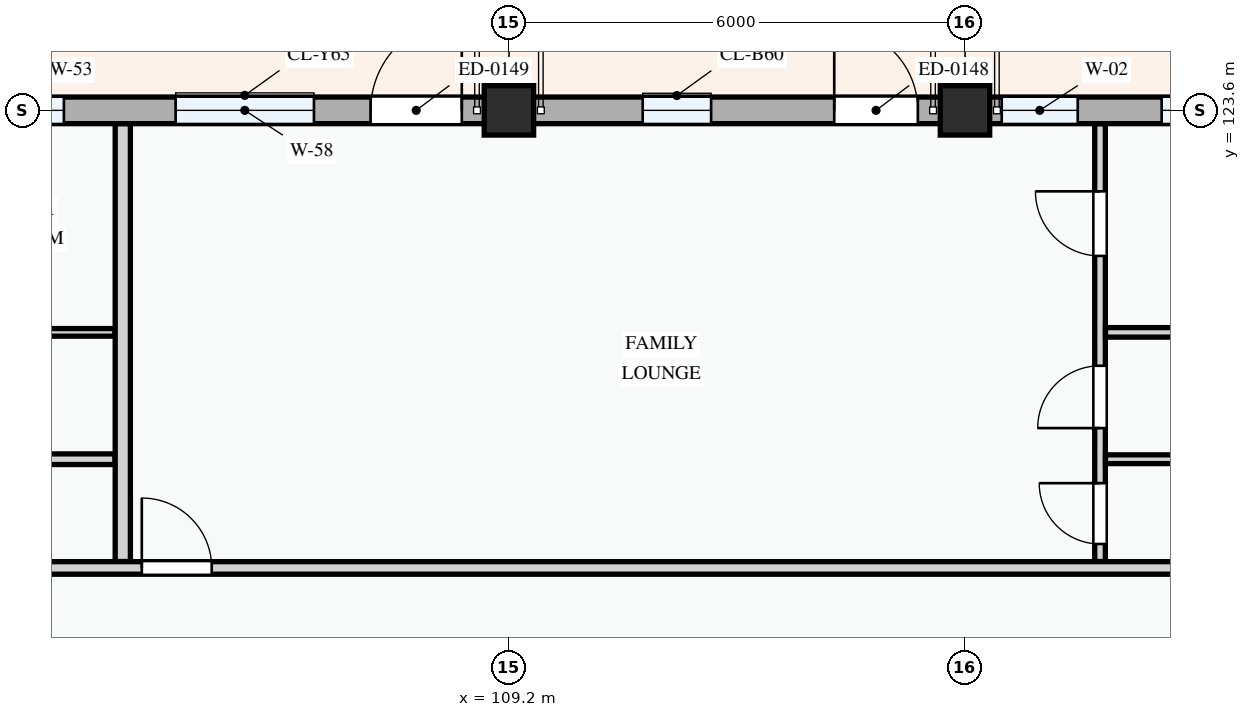
"""IFC4 building model, lengths in metres.
Left out: names, types, materials, properties, quantities, classifications, styles, units other than length and angle.
Written with IfcOpenShell. Run it as: python <this file> out.ifc"""

import sys

from ifc_helpers import new_model, si_unit, direction, frame, frame_2d, origin, origin_2d, place, context, subcontext, project, spatial, rectangle, extrude, element, fill, save


model = new_model("IFC4")
c1 = context("Model", 3, precision=1e-05, world=origin(), true_north=direction((0.0, 1.0)))
c2 = subcontext(c1, "Body", "Model", "MODEL_VIEW")
j1 = project(units=[si_unit("LENGTHUNIT", "METRE"), si_unit("PLANEANGLEUNIT", "RADIAN")], contexts=[c1])
p1 = place(None, origin())
s1 = spatial("IfcSite", under=j1, at=p1, CompositionType="ELEMENT")
p2 = place(p1, origin())
s2 = spatial("IfcBuilding", under=s1, at=p2, CompositionType="ELEMENT")
p3 = place(p2, frame((0.0, 0.0, 11.4)))
s3 = spatial("IfcBuildingStorey", under=s2, at=p3, CompositionType="ELEMENT", Elevation=11.4)
for number, where, z_axis, x_axis in (
    (1, (109.2, 123.6, 0.0), (0.0, 0.0, 1.0), (1.0, 0.0, 0.0)),
    (2, (115.2, 123.6, 0.0), (0.0, 0.0, 1.0), (1.0, 0.0, 0.0)),
):
    element("IfcColumn", number, at=place(p3, frame(where, z_axis=z_axis, x_axis=x_axis)), inside=s3, PredefinedType="COLUMN", context=c2, shape_type="SweptSolid", body=[
        extrude(rectangle(XDim=0.65, YDim=0.65, at=origin_2d()), origin(), (0.0, 0.0, 1.0), 3.3),
    ])
p4 = place(p3, frame((123.6, 123.6, 0.0), z_axis=(0.0, 0.0, 1.0), x_axis=(-1.0, 0.0, 0.0)))
e3 = element("IfcWall", 3, at=p4, inside=s3, PredefinedType="STANDARD", context=c2, shape_type="SweptSolid", body=[
    extrude(rectangle(XDim=8.4, YDim=0.35, at=frame_2d((4.2, 0.0))), origin(), (0.0, 0.0, 1.0), 2.375),
])
p5 = place(p4, frame((0.62, 0.0, 0.0)))
e4 = element("IfcOpeningElement", 4, at=p5, cuts=e3, PredefinedType="OPENING", context=c2, shape_type="SweptSolid", body=[
    extrude(rectangle(XDim=1.05, YDim=2.15, at=frame_2d((0.525, 1.075))), frame((0.0, 0.185, 0.0), z_axis=(0.0, -1.0, 0.0), x_axis=(1.0, 0.0, 0.0)), (0.0, 0.0, 1.0), 0.37),
])
p6 = place(p4, frame((2.221, 0.0, 0.78)))
e5 = element("IfcOpeningElement", 5, at=p6, cuts=e3, PredefinedType="OPENING", context=c2, shape_type="SweptSolid", body=[
    extrude(rectangle(XDim=1.52, YDim=1.42, at=frame_2d((0.76, 0.71))), frame((0.0, 0.185, 0.0), z_axis=(0.0, -1.0, 0.0), x_axis=(1.0, 0.0, 0.0)), (0.0, 0.0, 1.0), 0.37),
])
p7 = place(p4, frame((4.912, 0.0, 0.78)))
e6 = element("IfcOpeningElement", 6, at=p7, cuts=e3, PredefinedType="OPENING", context=c2, shape_type="SweptSolid", body=[
    extrude(rectangle(XDim=0.9, YDim=1.2, at=frame_2d((0.45, 0.6))), frame((0.0, 0.185, 0.0), z_axis=(0.0, -1.0, 0.0), x_axis=(1.0, 0.0, 0.0)), (0.0, 0.0, 1.0), 0.37),
])
p8 = place(p4, frame((6.917, 0.0, 0.78)))
e7 = element("IfcOpeningElement", 7, at=p8, cuts=e3, PredefinedType="OPENING", context=c2, shape_type="SweptSolid", body=[
    extrude(rectangle(XDim=1.0, YDim=1.25, at=frame_2d((0.5, 0.625))), frame((0.0, 0.185, 0.0), z_axis=(0.0, -1.0, 0.0), x_axis=(1.0, 0.0, 0.0)), (0.0, 0.0, 1.0), 0.37),
])
p9 = place(p3, frame((115.2, 123.6, 0.0), z_axis=(0.0, 0.0, 1.0), x_axis=(-1.0, 0.0, 0.0)))
e8 = element("IfcWall", 8, at=p9, inside=s3, PredefinedType="STANDARD", context=c2, shape_type="SweptSolid", body=[
    extrude(rectangle(XDim=6.0, YDim=0.35, at=frame_2d((3.0, 0.0))), origin(), (0.0, 0.0, 1.0), 2.475),
])
p10 = place(p9, frame((0.62, 0.0, 0.0)))
e9 = element("IfcOpeningElement", 9, at=p10, cuts=e8, PredefinedType="OPENING", context=c2, shape_type="SweptSolid", body=[
    extrude(rectangle(XDim=1.1, YDim=2.15, at=frame_2d((0.55, 1.075))), frame((0.0, 0.185, 0.0), z_axis=(0.0, -1.0, 0.0), x_axis=(1.0, 0.0, 0.0)), (0.0, 0.0, 1.0), 0.37),
])
p11 = place(p9, frame((3.34, 0.0, 0.78)))
e10 = element("IfcOpeningElement", 10, at=p11, cuts=e8, PredefinedType="OPENING", context=c2, shape_type="SweptSolid", body=[
    extrude(rectangle(XDim=0.9, YDim=1.2, at=frame_2d((0.45, 0.6))), frame((0.0, 0.185, 0.0), z_axis=(0.0, -1.0, 0.0), x_axis=(1.0, 0.0, 0.0)), (0.0, 0.0, 1.0), 0.37),
])
p12 = place(p3, frame((109.2, 123.6, 0.0), z_axis=(0.0, 0.0, 1.0), x_axis=(-1.0, 0.0, 0.0)))
e11 = element("IfcWall", 11, at=p12, inside=s3, PredefinedType="STANDARD", context=c2, shape_type="SweptSolid", body=[
    extrude(rectangle(XDim=8.4, YDim=0.35, at=frame_2d((4.2, 0.0))), origin(), (0.0, 0.0, 1.0), 2.375),
])
p13 = place(p12, frame((0.62, 0.0, 0.0)))
e12 = element("IfcOpeningElement", 12, at=p13, cuts=e11, PredefinedType="OPENING", context=c2, shape_type="SweptSolid", body=[
    extrude(rectangle(XDim=1.2, YDim=2.15, at=frame_2d((0.6, 1.075))), frame((0.0, 0.185, 0.0), z_axis=(0.0, -1.0, 0.0), x_axis=(1.0, 0.0, 0.0)), (0.0, 0.0, 1.0), 0.37),
])
p14 = place(p12, frame((2.565, 0.0, 0.78)))
e13 = element("IfcOpeningElement", 13, at=p14, cuts=e11, PredefinedType="OPENING", context=c2, shape_type="SweptSolid", body=[
    extrude(rectangle(XDim=1.82, YDim=1.46, at=frame_2d((0.91, 0.73))), frame((0.0, 0.185, 0.0), z_axis=(0.0, -1.0, 0.0), x_axis=(1.0, 0.0, 0.0)), (0.0, 0.0, 1.0), 0.37),
])
p15 = place(p12, frame((5.855, 0.0, 0.78)))
e14 = element("IfcOpeningElement", 14, at=p15, cuts=e11, PredefinedType="OPENING", context=c2, shape_type="SweptSolid", body=[
    extrude(rectangle(XDim=1.58, YDim=1.48, at=frame_2d((0.79, 0.74))), frame((0.0, 0.185, 0.0), z_axis=(0.0, -1.0, 0.0), x_axis=(1.0, 0.0, 0.0)), (0.0, 0.0, 1.0), 0.37),
])
p16 = place(p3, frame((91.876, 120.679, 0.0), z_axis=(0.0, 0.0, 1.0), x_axis=(1.0, 0.0, 0.0)))
e15 = element("IfcWall", 15, at=p16, inside=s3, PredefinedType="PARTITIONING", context=c2, shape_type="SweptSolid", body=[
    extrude(rectangle(XDim=12.142, YDim=0.1, at=frame_2d((6.071, 0.0))), origin(), (0.0, 0.0, 1.0), 3.0),
])
p17 = place(p3, frame((91.876, 119.01, 0.0), z_axis=(0.0, 0.0, 1.0), x_axis=(1.0, 0.0, 0.0)))
e16 = element("IfcWall", 16, at=p17, inside=s3, PredefinedType="PARTITIONING", context=c2, shape_type="SweptSolid", body=[
    extrude(rectangle(XDim=12.142, YDim=0.14, at=frame_2d((6.071, 0.0))), origin(), (0.0, 0.0, 1.0), 3.0),
])
p18 = place(p3, frame((116.977, 117.665, 0.0), z_axis=(0.0, 0.0, 1.0), x_axis=(0.0, 1.0, 0.0)))
e17 = element("IfcWall", 17, at=p18, inside=s3, PredefinedType="PARTITIONING", context=c2, shape_type="SweptSolid", body=[
    extrude(rectangle(XDim=5.759, YDim=0.14, at=frame_2d((2.879, 0.0))), origin(), (0.0, 0.0, 1.0), 3.0),
])
p19 = place(p18, frame((0.231, 0.0, 0.0)))
e18 = element("IfcOpeningElement", 18, at=p19, cuts=e17, PredefinedType="OPENING", context=c2, shape_type="SweptSolid", body=[
    extrude(rectangle(XDim=0.8, YDim=2.1, at=frame_2d((0.4, 1.05))), frame((0.0, 0.08, 0.0), z_axis=(0.0, -1.0, 0.0), x_axis=(1.0, 0.0, 0.0)), (0.0, 0.0, 1.0), 0.16),
])
p20 = place(p18, frame((1.755, 0.0, 0.0)))
e19 = element("IfcOpeningElement", 19, at=p20, cuts=e17, PredefinedType="OPENING", context=c2, shape_type="SweptSolid", body=[
    extrude(rectangle(XDim=0.82, YDim=2.08, at=frame_2d((0.41, 1.04))), frame((0.0, 0.08, 0.0), z_axis=(0.0, -1.0, 0.0), x_axis=(1.0, 0.0, 0.0)), (0.0, 0.0, 1.0), 0.16),
])
p21 = place(p18, frame((4.02, 0.0, 0.0)))
e20 = element("IfcOpeningElement", 20, at=p21, cuts=e17, PredefinedType="OPENING", context=c2, shape_type="SweptSolid", body=[
    extrude(rectangle(XDim=0.85, YDim=2.1, at=frame_2d((0.425, 1.05))), frame((0.0, 0.08, 0.0), z_axis=(0.0, -1.0, 0.0), x_axis=(1.0, 0.0, 0.0)), (0.0, 0.0, 1.0), 0.16),
])
p22 = place(p3, frame((117.049, 120.679, 0.0), z_axis=(0.0, 0.0, 1.0), x_axis=(1.0, 0.0, 0.0)))
e21 = element("IfcWall", 21, at=p22, inside=s3, PredefinedType="PARTITIONING", context=c2, shape_type="SweptSolid", body=[
    extrude(rectangle(XDim=10.637, YDim=0.125, at=frame_2d((5.318, 0.0))), origin(), (0.0, 0.0, 1.0), 3.0),
])
p23 = place(p3, frame((117.049, 119.01, 0.0), z_axis=(0.0, 0.0, 1.0), x_axis=(1.0, 0.0, 0.0)))
e22 = element("IfcWall", 22, at=p23, inside=s3, PredefinedType="PARTITIONING", context=c2, shape_type="SweptSolid", body=[
    extrude(rectangle(XDim=10.637, YDim=0.115, at=frame_2d((5.318, 0.0))), origin(), (0.0, 0.0, 1.0), 3.0),
])
p24 = place(p3, frame((104.12, 117.665, 0.0), z_axis=(0.0, 0.0, 1.0), x_axis=(0.0, 1.0, 0.0)))
e23 = element("IfcWall", 23, at=p24, inside=s3, PredefinedType="PARTITIONING", context=c2, shape_type="SweptSolid", body=[
    extrude(rectangle(XDim=5.759, YDim=0.2, at=frame_2d((2.879, 0.0))), origin(), (0.0, 0.0, 1.0), 3.0),
])
p25 = place(p3, frame((80.577, 117.58, 0.0), z_axis=(0.0, 0.0, 1.0), x_axis=(1.0, 0.0, 0.0)))
e24 = element("IfcWall", 24, at=p25, inside=s3, PredefinedType="PARTITIONING", context=c2, shape_type="SweptSolid", body=[
    extrude(rectangle(XDim=71.963, YDim=0.165, at=frame_2d((35.981, 0.0))), origin(), (0.0, 0.0, 1.0), 3.0),
])
p26 = place(p25, frame((9.411, 0.0, 0.0)))
e25 = element("IfcOpeningElement", 25, at=p26, cuts=e24, PredefinedType="OPENING", context=c2, shape_type="SweptSolid", body=[
    extrude(rectangle(XDim=0.96, YDim=2.12, at=frame_2d((0.48, 1.06))), frame((0.0, 0.093, 0.0), z_axis=(0.0, -1.0, 0.0), x_axis=(1.0, 0.0, 0.0)), (0.0, 0.0, 1.0), 0.185),
])
p27 = place(p25, frame((23.793, 0.0, 0.0)))
e26 = element("IfcOpeningElement", 26, at=p27, cuts=e24, PredefinedType="OPENING", context=c2, shape_type="SweptSolid", body=[
    extrude(rectangle(XDim=0.92, YDim=2.1, at=frame_2d((0.46, 1.05))), frame((0.0, 0.093, 0.0), z_axis=(0.0, -1.0, 0.0), x_axis=(1.0, 0.0, 0.0)), (0.0, 0.0, 1.0), 0.185),
])
p28 = place(p25, frame((52.718, 0.0, 0.0)))
e27 = element("IfcOpeningElement", 27, at=p28, cuts=e24, PredefinedType="OPENING", context=c2, shape_type="SweptSolid", body=[
    extrude(rectangle(XDim=0.92, YDim=2.1, at=frame_2d((0.46, 1.05))), frame((0.0, 0.093, 0.0), z_axis=(0.0, -1.0, 0.0), x_axis=(1.0, 0.0, 0.0)), (0.0, 0.0, 1.0), 0.185),
])
p29 = place(p7, origin())
e28 = element("IfcWindow", 28, at=p29, inside=s3, PartitioningType="SINGLE_PANEL", PredefinedType="WINDOW", context=c2, shape_type="SweptSolid", body=[
    extrude(rectangle(XDim=0.9, YDim=1.2, at=frame_2d((0.45, 0.6))), frame((0.0, 0.03, 0.0), z_axis=(0.0, -1.0, 0.0), x_axis=(1.0, 0.0, 0.0)), (0.0, 0.0, 1.0), 0.06),
])
fill(e6, e28)
p30 = place(p8, origin())
e29 = element("IfcWindow", 29, at=p30, inside=s3, PartitioningType="SINGLE_PANEL", PredefinedType="WINDOW", context=c2, shape_type="SweptSolid", body=[
    extrude(rectangle(XDim=1.0, YDim=1.25, at=frame_2d((0.5, 0.625))), frame((0.0, 0.03, 0.0), z_axis=(0.0, -1.0, 0.0), x_axis=(1.0, 0.0, 0.0)), (0.0, 0.0, 1.0), 0.06),
])
fill(e7, e29)
p31 = place(p10, frame((1.1, 0.0, 0.0), z_axis=(0.0, 0.0, 1.0), x_axis=(-1.0, 0.0, 0.0)))
e30 = element("IfcDoor", 30, at=p31, inside=s3, OperationType="SINGLE_SWING_LEFT", PredefinedType="DOOR", context=c2, shape_type="SweptSolid", body=[
    extrude(rectangle(XDim=1.1, YDim=2.15, at=frame_2d((0.55, 1.075))), frame((0.0, 0.025, 0.0), z_axis=(0.0, -1.0, 0.0), x_axis=(1.0, 0.0, 0.0)), (0.0, 0.0, 1.0), 0.05),
])
fill(e9, e30)
p32 = place(p11, origin())
e31 = element("IfcWindow", 31, at=p32, inside=s3, PartitioningType="SINGLE_PANEL", PredefinedType="WINDOW", context=c2, shape_type="SweptSolid", body=[
    extrude(rectangle(XDim=0.9, YDim=1.2, at=frame_2d((0.45, 0.6))), frame((0.0, 0.03, 0.0), z_axis=(0.0, -1.0, 0.0), x_axis=(1.0, 0.0, 0.0)), (0.0, 0.0, 1.0), 0.06),
])
fill(e10, e31)
p33 = place(p13, frame((1.2, 0.0, 0.0), z_axis=(0.0, 0.0, 1.0), x_axis=(-1.0, 0.0, 0.0)))
e32 = element("IfcDoor", 32, at=p33, inside=s3, OperationType="SINGLE_SWING_RIGHT", PredefinedType="DOOR", context=c2, shape_type="SweptSolid", body=[
    extrude(rectangle(XDim=1.2, YDim=2.15, at=frame_2d((0.6, 1.075))), frame((0.0, 0.025, 0.0), z_axis=(0.0, -1.0, 0.0), x_axis=(1.0, 0.0, 0.0)), (0.0, 0.0, 1.0), 0.05),
])
fill(e12, e32)
p34 = place(p14, origin())
e33 = element("IfcWindow", 33, at=p34, inside=s3, PartitioningType="DOUBLE_PANEL_VERTICAL", PredefinedType="WINDOW", context=c2, shape_type="SweptSolid", body=[
    extrude(rectangle(XDim=1.82, YDim=1.46, at=frame_2d((0.91, 0.73))), frame((0.0, 0.03, 0.0), z_axis=(0.0, -1.0, 0.0), x_axis=(1.0, 0.0, 0.0)), (0.0, 0.0, 1.0), 0.06),
])
fill(e13, e33)
p35 = place(p15, origin())
e34 = element("IfcWindow", 34, at=p35, inside=s3, PartitioningType="SINGLE_PANEL", PredefinedType="WINDOW", context=c2, shape_type="SweptSolid", body=[
    extrude(rectangle(XDim=1.58, YDim=1.48, at=frame_2d((0.79, 0.74))), frame((0.0, 0.03, 0.0), z_axis=(0.0, -1.0, 0.0), x_axis=(1.0, 0.0, 0.0)), (0.0, 0.0, 1.0), 0.06),
])
fill(e14, e34)
p36 = place(p19, origin())
e35 = element("IfcDoor", 35, at=p36, inside=s3, OperationType="SINGLE_SWING_RIGHT", PredefinedType="DOOR", context=c2, shape_type="SweptSolid", body=[
    extrude(rectangle(XDim=0.8, YDim=2.1, at=frame_2d((0.4, 1.05))), frame((0.0, 0.025, 0.0), z_axis=(0.0, -1.0, 0.0), x_axis=(1.0, 0.0, 0.0)), (0.0, 0.0, 1.0), 0.05),
])
fill(e18, e35)
p37 = place(p20, origin())
e36 = element("IfcDoor", 36, at=p37, inside=s3, OperationType="SINGLE_SWING_LEFT", PredefinedType="DOOR", context=c2, shape_type="SweptSolid", body=[
    extrude(rectangle(XDim=0.82, YDim=2.08, at=frame_2d((0.41, 1.04))), frame((0.0, 0.025, 0.0), z_axis=(0.0, -1.0, 0.0), x_axis=(1.0, 0.0, 0.0)), (0.0, 0.0, 1.0), 0.05),
])
fill(e19, e36)
p38 = place(p21, origin())
e37 = element("IfcDoor", 37, at=p38, inside=s3, OperationType="SINGLE_SWING_RIGHT", PredefinedType="DOOR", context=c2, shape_type="SweptSolid", body=[
    extrude(rectangle(XDim=0.85, YDim=2.1, at=frame_2d((0.425, 1.05))), frame((0.0, 0.025, 0.0), z_axis=(0.0, -1.0, 0.0), x_axis=(1.0, 0.0, 0.0)), (0.0, 0.0, 1.0), 0.05),
])
fill(e20, e37)
p39 = place(p27, origin())
e38 = element("IfcDoor", 38, at=p39, inside=s3, OperationType="SINGLE_SWING_LEFT", PredefinedType="DOOR", context=c2, shape_type="SweptSolid", body=[
    extrude(rectangle(XDim=0.92, YDim=2.1, at=frame_2d((0.46, 1.05))), frame((0.0, 0.025, 0.0), z_axis=(0.0, -1.0, 0.0), x_axis=(1.0, 0.0, 0.0)), (0.0, 0.0, 1.0), 0.05),
])
fill(e26, e38)
save(model, sys.argv[1])
